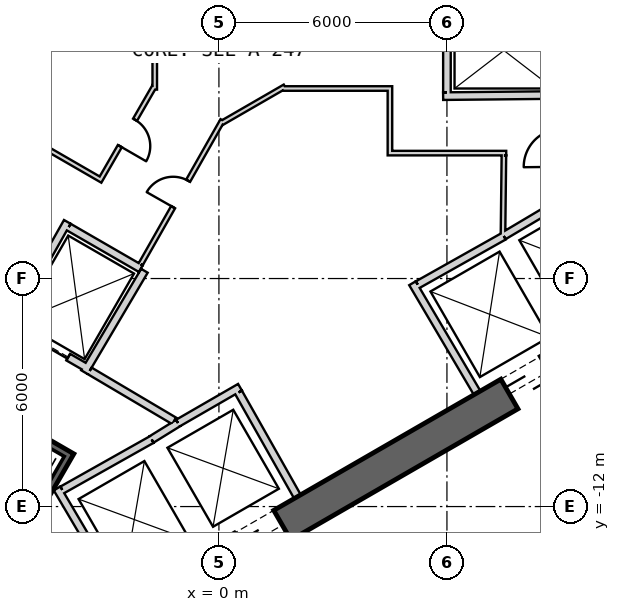
"""IFC4 building model, lengths in metres.
Left out: names, types, materials, properties, quantities, classifications, styles, units other than length and angle.
Written with IfcOpenShell. Run it as: python <this file> out.ifc"""

import sys

from ifc_helpers import new_model, si_unit, direction, frame, frame_2d, origin, place, context, subcontext, project, spatial, rectangle, extrude, element, fill, save


model = new_model("IFC4")
c1 = context("Model", 3, precision=1e-05, world=origin(), true_north=direction((0.0, 1.0)))
c2 = subcontext(c1, "Body", "Model", "MODEL_VIEW")
j1 = project(units=[si_unit("LENGTHUNIT", "METRE"), si_unit("PLANEANGLEUNIT", "RADIAN")], contexts=[c1])
p1 = place(None, origin())
s1 = spatial("IfcSite", under=j1, at=p1, CompositionType="ELEMENT")
p2 = place(p1, origin())
s2 = spatial("IfcBuilding", under=s1, at=p2, CompositionType="ELEMENT")
p3 = place(p2, frame((0.0, 0.0, 392.3)))
s3 = spatial("IfcBuildingStorey", under=s2, at=p3, CompositionType="ELEMENT", Elevation=392.3)
p4 = place(p3, frame((-7.825, -17.97, 0.0), z_axis=(0.0, 0.0, 1.0), x_axis=(0.866028369851, 0.499994862586, 0.0)))
e1 = element("IfcWall", 1, at=p4, inside=s3, PredefinedType="SHEAR", context=c2, shape_type="SweptSolid", body=[
    extrude(rectangle(XDim=31.523, YDim=0.9, at=frame_2d((15.762, 0.0))), origin(), (0.0, 0.0, 1.0), 6.0),
])
p5 = place(p4, frame((7.062, 0.0, 0.0)))
e2 = element("IfcOpeningElement", 2, at=p5, cuts=e1, PredefinedType="OPENING", context=c2, shape_type="SweptSolid", body=[
    extrude(rectangle(XDim=1.2, YDim=2.4, at=frame_2d((0.6, 1.2))), frame((0.0, 0.46, 0.0), z_axis=(0.0, -1.0, 0.0), x_axis=(1.0, 0.0, 0.0)), (0.0, 0.0, 1.0), 0.92),
])
p6 = place(p4, frame((9.762, 0.0, 0.0)))
e3 = element("IfcOpeningElement", 3, at=p6, cuts=e1, PredefinedType="OPENING", context=c2, shape_type="SweptSolid", body=[
    extrude(rectangle(XDim=1.2, YDim=2.4, at=frame_2d((0.6, 1.2))), frame((0.0, 0.46, 0.0), z_axis=(0.0, -1.0, 0.0), x_axis=(1.0, 0.0, 0.0)), (0.0, 0.0, 1.0), 0.92),
])
p7 = place(p4, frame((17.862, 0.0, 0.0)))
e4 = element("IfcOpeningElement", 4, at=p7, cuts=e1, PredefinedType="OPENING", context=c2, shape_type="SweptSolid", body=[
    extrude(rectangle(XDim=1.2, YDim=2.4, at=frame_2d((0.6, 1.2))), frame((0.0, 0.46, 0.0), z_axis=(0.0, -1.0, 0.0), x_axis=(1.0, 0.0, 0.0)), (0.0, 0.0, 1.0), 0.92),
])
p8 = place(p4, frame((20.562, 0.0, 0.0)))
e5 = element("IfcOpeningElement", 5, at=p8, cuts=e1, PredefinedType="OPENING", context=c2, shape_type="SweptSolid", body=[
    extrude(rectangle(XDim=1.2, YDim=2.4, at=frame_2d((0.6, 1.2))), frame((0.0, 0.46, 0.0), z_axis=(0.0, -1.0, 0.0), x_axis=(1.0, 0.0, 0.0)), (0.0, 0.0, 1.0), 0.92),
])
p9 = place(p4, frame((26.712, 0.0, 0.0)))
e6 = element("IfcOpeningElement", 6, at=p9, cuts=e1, PredefinedType="OPENING", context=c2, shape_type="SweptSolid", body=[
    extrude(rectangle(XDim=1.2, YDim=2.4, at=frame_2d((0.6, 1.2))), frame((0.0, 0.46, 0.0), z_axis=(0.0, -1.0, 0.0), x_axis=(1.0, 0.0, 0.0)), (0.0, 0.0, 1.0), 0.92),
])
p10 = place(p4, frame((3.612, 0.0, 0.0)))
e7 = element("IfcOpeningElement", 7, at=p10, cuts=e1, PredefinedType="OPENING", context=c2, shape_type="SweptSolid", body=[
    extrude(rectangle(XDim=1.2, YDim=2.4, at=frame_2d((0.6, 1.2))), frame((0.0, 0.46, 0.0), z_axis=(0.0, -1.0, 0.0), x_axis=(1.0, 0.0, 0.0)), (0.0, 0.0, 1.0), 0.92),
])
p11 = place(p3, frame((-2.558, -14.409, 0.0), z_axis=(0.0, 0.0, 1.0), x_axis=(-0.507997497166, 0.861358544901, 0.0)))
e8 = element("IfcWall", 8, at=p11, inside=s3, PredefinedType="PLUMBINGWALL", context=c2, shape_type="SweptSolid", body=[
    extrude(rectangle(XDim=3.35, YDim=0.2, at=frame_2d((1.675, 0.0))), origin(), (0.0, 0.0, 1.0), 5.7),
])
p12 = place(p3, frame((-1.769, -10.237, 0.0), z_axis=(0.0, 0.0, 1.0), x_axis=(-0.871534483978, -0.490334215854, 0.0)))
e9 = element("IfcWall", 9, at=p12, inside=s3, PredefinedType="PLUMBINGWALL", context=c2, shape_type="SweptSolid", body=[
    extrude(rectangle(XDim=2.7, YDim=0.2, at=frame_2d((1.35, 0.0))), origin(), (0.0, 0.0, 1.0), 5.7),
])
p13 = place(p3, frame((-1.076, -9.803, 0.0), z_axis=(0.0, 0.0, 1.0), x_axis=(-0.850341601995, -0.526231089842, 0.0)))
e10 = element("IfcWall", 10, at=p13, inside=s3, PredefinedType="PLUMBINGWALL", context=c2, shape_type="SweptSolid", body=[
    extrude(rectangle(XDim=0.817, YDim=0.2, at=frame_2d((0.408, 0.0))), origin(), (0.0, 0.0, 1.0), 5.7),
])
p14 = place(p3, frame((-1.077, -9.802, 0.0), z_axis=(0.0, 0.0, 1.0), x_axis=(0.865993522811, 0.500055215401, 0.0)))
e11 = element("IfcWall", 11, at=p14, inside=s3, PredefinedType="PLUMBINGWALL", context=c2, shape_type="SweptSolid", body=[
    extrude(rectangle(XDim=1.884, YDim=0.2, at=frame_2d((0.942, 0.0))), origin(), (0.0, 0.0, 1.0), 5.7),
])
p15 = place(p3, frame((0.517, -8.997, 0.0), z_axis=(0.0, 0.0, 1.0), x_axis=(0.491993409184, -0.87059892334, 0.0)))
e12 = element("IfcWall", 12, at=p15, inside=s3, PredefinedType="PLUMBINGWALL", context=c2, shape_type="SweptSolid", body=[
    extrude(rectangle(XDim=3.15, YDim=0.2, at=frame_2d((1.575, 0.0))), origin(), (0.0, 0.0, 1.0), 5.7),
])
p16 = place(p3, frame((6.795, -9.01, 0.0), z_axis=(0.0, 0.0, 1.0), x_axis=(-0.507997497166, 0.861358544901, 0.0)))
e13 = element("IfcWall", 13, at=p16, inside=s3, PredefinedType="PLUMBINGWALL", context=c2, shape_type="SweptSolid", body=[
    extrude(rectangle(XDim=3.35, YDim=0.2, at=frame_2d((1.675, 0.0))), origin(), (0.0, 0.0, 1.0), 5.7),
])
p17 = place(p3, frame((5.231, -6.161, 0.0), z_axis=(0.0, 0.0, 1.0), x_axis=(0.871540428464, 0.4903236498, 0.0)))
e14 = element("IfcWall", 14, at=p17, inside=s3, PredefinedType="PLUMBINGWALL", context=c2, shape_type="SweptSolid", body=[
    extrude(rectangle(XDim=2.6, YDim=0.2, at=frame_2d((1.3, 0.0))), origin(), (0.0, 0.0, 1.0), 5.7),
])
p18 = place(p3, frame((7.493, -4.878, 0.0), z_axis=(0.0, 0.0, 1.0), x_axis=(0.859981807212, 0.510324691999, 0.0)))
e15 = element("IfcWall", 15, at=p18, inside=s3, PredefinedType="PLUMBINGWALL", context=c2, shape_type="SweptSolid", body=[
    extrude(rectangle(XDim=1.845, YDim=0.2, at=frame_2d((0.922, 0.0))), origin(), (0.0, 0.0, 1.0), 5.7),
])
p19 = place(p3, frame((5.9, -1.201, 0.0), z_axis=(0.0, 0.0, 1.0), x_axis=(0.999950064753, 0.009993397809, 0.0)))
e16 = element("IfcWall", 16, at=p19, inside=s3, PredefinedType="PLUMBINGWALL", context=c2, shape_type="SweptSolid", body=[
    extrude(rectangle(XDim=3.2, YDim=0.2, at=frame_2d((1.6, 0.0))), origin(), (0.0, 0.0, 1.0), 5.7),
])
p20 = place(p3, frame((6.0, -1.1, 0.0), z_axis=(0.0, 0.0, 1.0), x_axis=(0.0, 1.0, 0.0)))
e17 = element("IfcWall", 17, at=p20, inside=s3, PredefinedType="PLUMBINGWALL", context=c2, shape_type="SweptSolid", body=[
    extrude(rectangle(XDim=2.205, YDim=0.2, at=frame_2d((1.102, 0.0))), origin(), (0.0, 0.0, 1.0), 5.7),
])
p21 = place(p3, frame((-3.905, -10.563, -0.35), z_axis=(0.0, 0.0, 1.0), x_axis=(-0.500012932018, -0.866017937352, 0.0)))
e18 = element("IfcWall", 18, at=p21, inside=s3, PredefinedType="SHEAR", context=c2, shape_type="SweptSolid", body=[
    extrude(rectangle(XDim=8.1, YDim=0.2, at=frame_2d((4.05, 0.0))), origin(), (0.0, 0.0, 1.0), 6.05),
])
p22 = place(p3, frame((-4.041, -10.599, -0.35), z_axis=(0.0, 0.0, 1.0), x_axis=(-0.866047807691, 0.499961193289, 0.0)))
e19 = element("IfcWall", 19, at=p22, inside=s3, PredefinedType="SHEAR", context=c2, shape_type="SweptSolid", body=[
    extrude(rectangle(XDim=3.6, YDim=0.2, at=frame_2d((1.8, 0.0))), origin(), (0.0, 0.0, 1.0), 6.05),
])
p23 = place(p22, frame((1.25, 0.0, 0.35)))
e20 = element("IfcOpeningElement", 20, at=p23, cuts=e19, PredefinedType="OPENING", context=c2, shape_type="SweptSolid", body=[
    extrude(rectangle(XDim=1.1, YDim=2.1, at=frame_2d((0.55, 1.05))), frame((0.0, 0.11, 0.0), z_axis=(0.0, -1.0, 0.0), x_axis=(1.0, 0.0, 0.0)), (0.0, 0.0, 1.0), 0.22),
])
p24 = place(p3, frame((-3.446, -8.368, 0.0), z_axis=(0.0, 0.0, 1.0), x_axis=(-0.866024647952, 0.500001309137, 0.0)))
e21 = element("IfcWall", 21, at=p24, inside=s3, PredefinedType="PLUMBINGWALL", context=c2, shape_type="SweptSolid", body=[
    extrude(rectangle(XDim=2.4, YDim=0.2, at=frame_2d((1.2, 0.0))), origin(), (0.0, 0.0, 1.0), 5.7),
])
p25 = place(p24, frame((0.6, 0.0, 0.0)))
e22 = element("IfcOpeningElement", 22, at=p25, cuts=e21, PredefinedType="OPENING", context=c2, shape_type="SweptSolid", body=[
    extrude(rectangle(XDim=1.2, YDim=2.4, at=frame_2d((0.6, 1.2))), frame((0.0, 0.11, 0.0), z_axis=(0.0, -1.0, 0.0), x_axis=(1.0, 0.0, 0.0)), (0.0, 0.0, 1.0), 0.22),
])
p26 = place(p3, frame((-1.961, -5.796, 0.0), z_axis=(0.0, 0.0, 1.0), x_axis=(-0.508647062354, -0.860975125052, 0.0)))
e23 = element("IfcWall", 23, at=p26, inside=s3, PredefinedType="PLUMBINGWALL", context=c2, shape_type="SweptSolid", body=[
    extrude(rectangle(XDim=3.1, YDim=0.2, at=frame_2d((1.55, 0.0))), origin(), (0.0, 0.0, 1.0), 5.7),
])
p27 = place(p3, frame((-3.99, -4.509, 0.0), z_axis=(0.0, 0.0, 1.0), x_axis=(-0.491358283181, -0.870957540612, 0.0)))
e24 = element("IfcWall", 24, at=p27, inside=s3, PredefinedType="PLUMBINGWALL", context=c2, shape_type="SweptSolid", body=[
    extrude(rectangle(XDim=3.2, YDim=0.2, at=frame_2d((1.6, 0.0))), origin(), (0.0, 0.0, 1.0), 5.7),
])
p28 = place(p3, frame((-3.953, -4.646, 0.0), z_axis=(0.0, 0.0, 1.0), x_axis=(0.866038900241, -0.499976622722, 0.0)))
e25 = element("IfcWall", 25, at=p28, inside=s3, PredefinedType="PLUMBINGWALL", context=c2, shape_type="SweptSolid", body=[
    extrude(rectangle(XDim=2.189, YDim=0.2, at=frame_2d((1.095, 0.0))), origin(), (0.0, 0.0, 1.0), 5.7),
])
p29 = place(p3, frame((-3.401, -8.43, 0.0), z_axis=(0.0, 0.0, 1.0), x_axis=(0.860630814782, -0.509229418482, 0.0)))
e26 = element("IfcWall", 26, at=p29, inside=s3, PredefinedType="PARTITIONING", context=c2, shape_type="SweptSolid", body=[
    extrude(rectangle(XDim=2.582, YDim=0.2, at=frame_2d((1.291, 0.0))), origin(), (0.0, 0.0, 1.0), 5.7),
])
p30 = place(p3, frame((0.094, -1.836, 0.0), z_axis=(0.0, 0.0, 1.0), x_axis=(-0.494097972448, -0.869406230495, 0.0)))
e27 = element("IfcWall", 27, at=p30, inside=s3, PredefinedType="PARTITIONING", context=c2, shape_type="SweptSolid", body=[
    extrude(rectangle(XDim=4.357, YDim=0.12, at=frame_2d((2.179, 0.0))), origin(), (0.0, 0.0, 1.0), 5.7),
])
p31 = place(p30, frame((1.83, 0.0, 0.0)))
e28 = element("IfcOpeningElement", 28, at=p31, cuts=e27, PredefinedType="OPENING", context=c2, shape_type="SweptSolid", body=[
    extrude(rectangle(XDim=0.8, YDim=2.1, at=frame_2d((0.4, 1.05))), frame((0.0, 0.07, 0.0), z_axis=(0.0, -1.0, 0.0), x_axis=(1.0, 0.0, 0.0)), (0.0, 0.0, 1.0), 0.14),
])
p32 = place(p3, frame((1.735, -0.948, 0.0), z_axis=(0.0, 0.0, 1.0), x_axis=(-0.866021702275, -0.500006411147, 0.0)))
e29 = element("IfcWall", 29, at=p32, inside=s3, PredefinedType="PARTITIONING", context=c2, shape_type="SweptSolid", body=[
    extrude(rectangle(XDim=1.935, YDim=0.12, at=frame_2d((0.968, 0.0))), origin(), (0.0, 0.0, 1.0), 5.7),
])
p33 = place(p3, frame((4.56, -1.0, 0.0), z_axis=(0.0, 0.0, 1.0), x_axis=(-1.0, 0.0, 0.0)))
e30 = element("IfcWall", 30, at=p33, inside=s3, PredefinedType="PARTITIONING", context=c2, shape_type="SweptSolid", body=[
    extrude(rectangle(XDim=2.896, YDim=0.12, at=frame_2d((1.448, 0.0))), origin(), (0.0, 0.0, 1.0), 5.7),
])
p34 = place(p3, frame((4.5, -2.76, 0.0), z_axis=(0.0, 0.0, 1.0), x_axis=(0.0, 1.0, 0.0)))
e31 = element("IfcWall", 31, at=p34, inside=s3, PredefinedType="PARTITIONING", context=c2, shape_type="SweptSolid", body=[
    extrude(rectangle(XDim=1.7, YDim=0.12, at=frame_2d((0.85, 0.0))), origin(), (0.0, 0.0, 1.0), 5.7),
])
p35 = place(p3, frame((7.56, -2.7, 0.0), z_axis=(0.0, 0.0, 1.0), x_axis=(-1.0, 0.0, 0.0)))
e32 = element("IfcWall", 32, at=p35, inside=s3, PredefinedType="PARTITIONING", context=c2, shape_type="SweptSolid", body=[
    extrude(rectangle(XDim=3.0, YDim=0.12, at=frame_2d((1.5, 0.0))), origin(), (0.0, 0.0, 1.0), 5.7),
])
p36 = place(p3, frame((7.475, -4.865, 0.0), z_axis=(0.0, 0.0, 1.0), x_axis=(0.011716133148, 0.999931363757, 0.0)))
e33 = element("IfcWall", 33, at=p36, inside=s3, PredefinedType="PARTITIONING", context=c2, shape_type="SweptSolid", body=[
    extrude(rectangle(XDim=2.105, YDim=0.12, at=frame_2d((1.052, 0.0))), origin(), (0.0, 0.0, 1.0), 5.7),
])
p37 = place(p3, frame((-1.689, -1.029, 0.0), z_axis=(0.0, 0.0, 1.0), x_axis=(0.0, 1.0, 0.0)))
e34 = element("IfcWall", 34, at=p37, inside=s3, PredefinedType="PARTITIONING", context=c2, shape_type="SweptSolid", body=[
    extrude(rectangle(XDim=1.935, YDim=0.12, at=frame_2d((0.968, 0.0))), origin(), (0.0, 0.0, 1.0), 5.7),
])
p38 = place(p3, frame((-3.146, -3.449, 0.0), z_axis=(0.0, 0.0, 1.0), x_axis=(0.500028961621, 0.866008682139, 0.0)))
e35 = element("IfcWall", 35, at=p38, inside=s3, PredefinedType="PARTITIONING", context=c2, shape_type="SweptSolid", body=[
    extrude(rectangle(XDim=2.896, YDim=0.12, at=frame_2d((1.448, 0.0))), origin(), (0.0, 0.0, 1.0), 5.7),
])
p39 = place(p38, frame((1.078, 0.0, 0.0)))
e36 = element("IfcOpeningElement", 36, at=p39, cuts=e35, PredefinedType="OPENING", context=c2, shape_type="SweptSolid", body=[
    extrude(rectangle(XDim=0.8, YDim=2.1, at=frame_2d((0.4, 1.05))), frame((0.0, 0.07, 0.0), z_axis=(0.0, -1.0, 0.0), x_axis=(1.0, 0.0, 0.0)), (0.0, 0.0, 1.0), 0.14),
])
p40 = place(p3, frame((-4.64, -2.517, 0.0), z_axis=(0.0, 0.0, 1.0), x_axis=(0.865989465428, -0.500062241894, 0.0)))
e37 = element("IfcWall", 37, at=p40, inside=s3, PredefinedType="PARTITIONING", context=c2, shape_type="SweptSolid", body=[
    extrude(rectangle(XDim=1.7, YDim=0.12, at=frame_2d((0.85, 0.0))), origin(), (0.0, 0.0, 1.0), 5.7),
])
p41 = place(p3, frame((7.984, -14.559, 0.0), z_axis=(0.0, 0.0, 1.0), x_axis=(0.866028009752, 0.499995486305, 0.0)))
e38 = element("IfcWall", 38, at=p41, inside=s3, PredefinedType="PARTITIONING", context=c2, shape_type="SweptSolid", body=[
    extrude(rectangle(XDim=16.9, YDim=0.2, at=frame_2d((8.45, 0.0))), origin(), (0.0, 0.0, 1.0), 5.07),
])
p42 = place(p41, frame((8.056, 0.0, 0.0)))
e39 = element("IfcOpeningElement", 39, at=p42, cuts=e38, PredefinedType="OPENING", context=c2, shape_type="SweptSolid", body=[
    extrude(rectangle(XDim=1.0, YDim=2.1, at=frame_2d((0.5, 1.05))), frame((0.0, 0.11, 0.0), z_axis=(0.0, -1.0, 0.0), x_axis=(1.0, 0.0, 0.0)), (0.0, 0.0, 1.0), 0.22),
])
p43 = place(p25, origin())
e40 = element("IfcDoor", 40, at=p43, inside=s3, OperationType="SLIDING_TO_LEFT", PredefinedType="USERDEFINED", context=c2, shape_type="SweptSolid", body=[
    extrude(rectangle(XDim=1.2, YDim=2.4, at=frame_2d((0.6, 1.2))), frame((0.0, 0.025, 0.0), z_axis=(0.0, -1.0, 0.0), x_axis=(1.0, 0.0, 0.0)), (0.0, 0.0, 1.0), 0.05),
])
fill(e22, e40)
p44 = place(p31, origin())
e41 = element("IfcDoor", 41, at=p44, inside=s3, OperationType="SINGLE_SWING_RIGHT", PredefinedType="USERDEFINED", context=c2, shape_type="SweptSolid", body=[
    extrude(rectangle(XDim=0.8, YDim=2.1, at=frame_2d((0.4, 1.05))), frame((0.0, 0.025, 0.0), z_axis=(0.0, -1.0, 0.0), x_axis=(1.0, 0.0, 0.0)), (0.0, 0.0, 1.0), 0.05),
])
fill(e28, e41)
p45 = place(p39, origin())
e42 = element("IfcDoor", 42, at=p45, inside=s3, OperationType="SINGLE_SWING_LEFT", PredefinedType="USERDEFINED", context=c2, shape_type="SweptSolid", body=[
    extrude(rectangle(XDim=0.8, YDim=2.1, at=frame_2d((0.4, 1.05))), frame((0.0, 0.025, 0.0), z_axis=(0.0, -1.0, 0.0), x_axis=(1.0, 0.0, 0.0)), (0.0, 0.0, 1.0), 0.05),
])
fill(e36, e42)
p46 = place(p6, origin())
e43 = element("IfcDoor", 43, at=p46, inside=s3, OperationType="SLIDING_TO_LEFT", PredefinedType="USERDEFINED", context=c2, shape_type="SweptSolid", body=[
    extrude(rectangle(XDim=1.2, YDim=2.4, at=frame_2d((0.6, 1.2))), frame((0.0, 0.025, 0.0), z_axis=(0.0, -1.0, 0.0), x_axis=(1.0, 0.0, 0.0)), (0.0, 0.0, 1.0), 0.05),
])
fill(e3, e43)
p47 = place(p7, origin())
e44 = element("IfcDoor", 44, at=p47, inside=s3, OperationType="SLIDING_TO_LEFT", PredefinedType="USERDEFINED", context=c2, shape_type="SweptSolid", body=[
    extrude(rectangle(XDim=1.2, YDim=2.4, at=frame_2d((0.6, 1.2))), frame((0.0, 0.025, 0.0), z_axis=(0.0, -1.0, 0.0), x_axis=(1.0, 0.0, 0.0)), (0.0, 0.0, 1.0), 0.05),
])
fill(e4, e44)
save(model, sys.argv[1])
